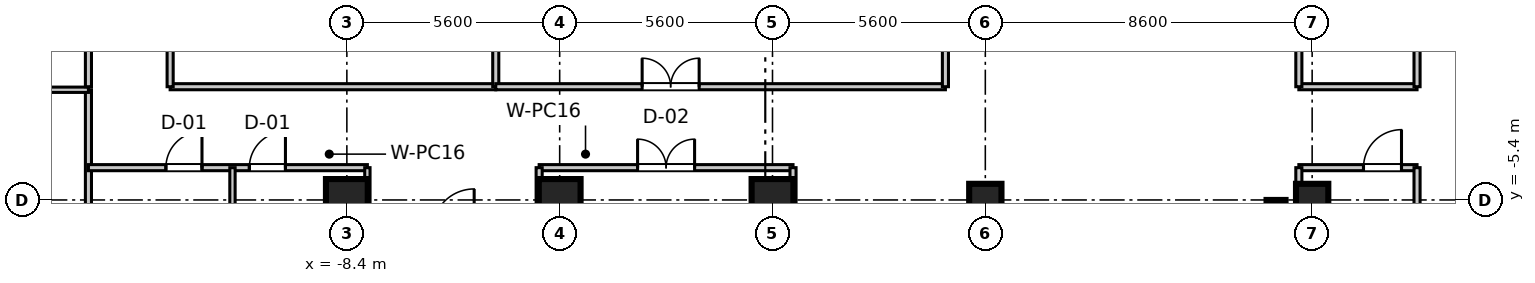
"""IFC4 building model, lengths in metres.
Left out: names, types, materials, properties, quantities, classifications, styles, units other than length and angle.
Written with IfcOpenShell. Run it as: python <this file> out.ifc"""

import sys

from ifc_helpers import new_model, si_unit, direction, frame, frame_2d, origin, origin_2d, place, context, subcontext, project, spatial, rectangle, extrude, source, transform, mapped, element, fill, save


model = new_model("IFC4")
c1 = context("Model", 3, precision=1e-05, world=origin(), true_north=direction((0.0, 1.0)))
c2 = subcontext(c1, "Body", "Model", "MODEL_VIEW")
j1 = project(units=[si_unit("LENGTHUNIT", "METRE"), si_unit("PLANEANGLEUNIT", "RADIAN")], contexts=[c1])
p1 = place(None, origin())
s1 = spatial("IfcSite", under=j1, at=p1, CompositionType="ELEMENT")
p2 = place(p1, origin())
s2 = spatial("IfcBuilding", under=s1, at=p2, CompositionType="ELEMENT")
p3 = place(p2, frame((0.0, 0.0, 149.0)))
s3 = spatial("IfcBuildingStorey", under=s2, at=p3, CompositionType="ELEMENT", Elevation=149.0)
m1 = source(origin(), c2, "Body", "SweptSolid", [
    extrude(rectangle(XDim=1.1, YDim=1.1, at=origin_2d()), origin(), (0.0, 0.0, 1.0), 3.605),
])
for number, where, z_axis, x_axis in (
    (1, (-8.4, -5.4, 0.0), (0.0, 0.0, 1.0), (1.0, 0.0, 0.0)),
    (2, (-2.8, -5.4, 0.0), (0.0, 0.0, 1.0), (1.0, 0.0, 0.0)),
    (3, (2.8, -5.4, 0.0), (0.0, 0.0, 1.0), (1.0, 0.0, 0.0)),
):
    element("IfcColumn", number, at=place(p3, frame(where, z_axis=z_axis, x_axis=x_axis)), inside=s3, PredefinedType="COLUMN", context=c2, shape_type="MappedRepresentation", body=[
        mapped(m1, transform((0.0, 0.0, 0.0), scale=1.0)),
    ])
m2 = source(origin(), c2, "Body", "SweptSolid", [
    extrude(rectangle(XDim=0.85, YDim=0.85, at=origin_2d()), origin(), (0.0, 0.0, 1.0), 3.605),
])
for number, where, z_axis, x_axis in (
    (4, (8.4, -5.4, 0.0), (0.0, 0.0, 1.0), (1.0, 0.0, 0.0)),
    (5, (17.0, -5.4, 0.0), (0.0, 0.0, 1.0), (1.0, 0.0, 0.0)),
):
    element("IfcColumn", number, at=place(p3, frame(where, z_axis=z_axis, x_axis=x_axis)), inside=s3, PredefinedType="PILASTER", context=c2, shape_type="MappedRepresentation", body=[
        mapped(m2, transform((0.0, 0.0, 0.0), scale=1.0)),
    ])
m3 = source(origin(), c2, "Body", "SweptSolid", [
    extrude(rectangle(XDim=11.6, YDim=0.5, at=frame_2d((5.8, 0.0))), origin(), (0.0, 0.0, 1.0), 3.39),
])
p4 = place(p3, frame((16.05, -17.0, 0.0), z_axis=(0.0, 0.0, 1.0), x_axis=(0.0, 1.0, 0.0)))
e6 = element("IfcWall", 6, at=p4, inside=s3, PredefinedType="SHEAR", context=c2, shape_type="MappedRepresentation", body=[
    mapped(m3, transform((0.0, 0.0, 0.0), scale=1.0)),
])
m4 = source(origin(), c2, "Body", "SweptSolid", [
    extrude(rectangle(XDim=3.11, YDim=0.16, at=frame_2d((1.555, 0.0))), origin(), (0.0, 0.0, 1.0), 2.73),
])
p5 = place(p3, frame((16.65, -4.55, 0.0), z_axis=(0.0, 0.0, 1.0), x_axis=(1.0, 0.0, 0.0)))
e7 = element("IfcWall", 7, at=p5, inside=s3, PredefinedType="PARTITIONING", context=c2, shape_type="MappedRepresentation", body=[
    mapped(m4, transform((0.0, 0.0, 0.0), scale=1.0)),
])
p6 = place(p5, frame((1.701, 0.0, 0.0)))
e8 = element("IfcOpeningElement", 8, at=p6, cuts=e7, PredefinedType="OPENING", context=c2, shape_type="SweptSolid", body=[
    extrude(rectangle(XDim=1.0, YDim=2.1, at=frame_2d((0.5, 1.05))), frame((0.0, 0.09, 0.0), z_axis=(0.0, -1.0, 0.0), x_axis=(1.0, 0.0, 0.0)), (0.0, 0.0, 1.0), 0.18),
])
m5 = source(origin(), c2, "Body", "SweptSolid", [
    extrude(rectangle(XDim=17.95, YDim=0.16, at=frame_2d((8.975, 0.0))), origin(), (0.0, 0.0, 1.0), 2.73),
])
p7 = place(p3, frame((16.65, -22.5, 0.0), z_axis=(0.0, 0.0, 1.0), x_axis=(0.0, 1.0, 0.0)))
e9 = element("IfcWall", 9, at=p7, inside=s3, PredefinedType="PARTITIONING", context=c2, shape_type="MappedRepresentation", body=[
    mapped(m5, transform((0.0, 0.0, 0.0), scale=1.0)),
])
m6 = source(origin(), c2, "Body", "SweptSolid", [
    extrude(rectangle(XDim=16.53, YDim=0.16, at=frame_2d((8.265, 0.0))), origin(), (0.0, 0.0, 1.0), 2.73),
])
p8 = place(p3, frame((19.76, -21.08, 0.0), z_axis=(0.0, 0.0, 1.0), x_axis=(0.0, 1.0, 0.0)))
e10 = element("IfcWall", 10, at=p8, inside=s3, PredefinedType="PARTITIONING", context=c2, shape_type="MappedRepresentation", body=[
    mapped(m6, transform((0.0, 0.0, 0.0), scale=1.0)),
])
m7 = source(origin(), c2, "Body", "SweptSolid", [
    extrude(rectangle(XDim=20.0, YDim=0.16, at=frame_2d((10.0, 0.0))), origin(), (0.0, 0.0, 1.0), 2.73),
])
p9 = place(p3, frame((-15.2, -22.5, 0.0), z_axis=(0.0, 0.0, 1.0), x_axis=(0.0, 1.0, 0.0)))
e11 = element("IfcWall", 11, at=p9, inside=s3, PredefinedType="PARTITIONING", context=c2, shape_type="MappedRepresentation", body=[
    mapped(m7, transform((0.0, 0.0, 0.0), scale=1.0)),
])
p10 = place(p9, frame((10.785, 0.0, 0.0)))
e12 = element("IfcOpeningElement", 12, at=p10, cuts=e11, PredefinedType="OPENING", context=c2, shape_type="SweptSolid", body=[
    extrude(rectangle(XDim=0.95, YDim=2.1, at=frame_2d((0.475, 1.05))), frame((0.0, 0.09, 0.0), z_axis=(0.0, -1.0, 0.0), x_axis=(1.0, 0.0, 0.0)), (0.0, 0.0, 1.0), 0.18),
])
m8 = source(origin(), c2, "Body", "SweptSolid", [
    extrude(rectangle(XDim=4.56, YDim=0.14, at=frame_2d((2.28, 0.0))), origin(), (0.0, 0.0, 1.0), 2.73),
])
p11 = place(p3, frame((-19.76, -2.5, 0.0), z_axis=(0.0, 0.0, 1.0), x_axis=(1.0, 0.0, 0.0)))
e13 = element("IfcWall", 13, at=p11, inside=s3, PredefinedType="PARTITIONING", context=c2, shape_type="MappedRepresentation", body=[
    mapped(m8, transform((0.0, 0.0, 0.0), scale=1.0)),
])
m9 = source(origin(), c2, "Body", "SweptSolid", [
    extrude(rectangle(XDim=7.34, YDim=0.16, at=frame_2d((3.67, 0.0))), origin(), (0.0, 0.0, 1.0), 2.73),
])
p12 = place(p3, frame((-15.2, -4.55, 0.0), z_axis=(0.0, 0.0, 1.0), x_axis=(1.0, 0.0, 0.0)))
e14 = element("IfcWall", 14, at=p12, inside=s3, PredefinedType="PARTITIONING", context=c2, shape_type="MappedRepresentation", body=[
    mapped(m9, transform((0.0, 0.0, 0.0), scale=1.0)),
])
p13 = place(p12, frame((2.038, 0.0, 0.0)))
e15 = element("IfcOpeningElement", 15, at=p13, cuts=e14, PredefinedType="OPENING", context=c2, shape_type="SweptSolid", body=[
    extrude(rectangle(XDim=0.95, YDim=2.1, at=frame_2d((0.475, 1.05))), frame((0.0, 0.09, 0.0), z_axis=(0.0, -1.0, 0.0), x_axis=(1.0, 0.0, 0.0)), (0.0, 0.0, 1.0), 0.18),
])
p14 = place(p12, frame((4.234, 0.0, 0.0)))
e16 = element("IfcOpeningElement", 16, at=p14, cuts=e14, PredefinedType="OPENING", context=c2, shape_type="SweptSolid", body=[
    extrude(rectangle(XDim=0.95, YDim=2.1, at=frame_2d((0.475, 1.05))), frame((0.0, 0.09, 0.0), z_axis=(0.0, -1.0, 0.0), x_axis=(1.0, 0.0, 0.0)), (0.0, 0.0, 1.0), 0.18),
])
m10 = source(origin(), c2, "Body", "SweptSolid", [
    extrude(rectangle(XDim=17.95, YDim=0.14, at=frame_2d((8.975, 0.0))), origin(), (0.0, 0.0, 1.0), 2.73),
])
for number, where, z_axis, x_axis in (
    (17, (-7.86, -22.5, 0.0), (0.0, 0.0, 1.0), (0.0, 1.0, 0.0)),
    (18, (-11.41, -22.5, 0.0), (0.0, 0.0, 1.0), (0.0, 1.0, 0.0)),
):
    element("IfcWall", number, at=place(p3, frame(where, z_axis=z_axis, x_axis=x_axis)), inside=s3, PredefinedType="PARTITIONING", context=c2, shape_type="MappedRepresentation", body=[
        mapped(m10, transform((0.0, 0.0, 0.0), scale=1.0)),
    ])
m11 = source(origin(), c2, "Body", "SweptSolid", [
    extrude(rectangle(XDim=6.68, YDim=0.16, at=frame_2d((3.34, 0.0))), origin(), (0.0, 0.0, 1.0), 2.73),
])
p15 = place(p3, frame((-3.34, -4.55, 0.0), z_axis=(0.0, 0.0, 1.0), x_axis=(1.0, 0.0, 0.0)))
e19 = element("IfcWall", 19, at=p15, inside=s3, PredefinedType="PARTITIONING", context=c2, shape_type="MappedRepresentation", body=[
    mapped(m11, transform((0.0, 0.0, 0.0), scale=1.0)),
])
p16 = place(p15, frame((2.59, 0.0, 0.0)))
e20 = element("IfcOpeningElement", 20, at=p16, cuts=e19, PredefinedType="OPENING", context=c2, shape_type="SweptSolid", body=[
    extrude(rectangle(XDim=1.5, YDim=2.15, at=frame_2d((0.75, 1.075))), frame((0.0, 0.09, 0.0), z_axis=(0.0, -1.0, 0.0), x_axis=(1.0, 0.0, 0.0)), (0.0, 0.0, 1.0), 0.18),
])
for number, where, z_axis, x_axis in (
    (21, (-3.34, -22.5, 0.0), (0.0, 0.0, 1.0), (0.0, 1.0, 0.0)),
    (22, (3.34, -22.5, 0.0), (0.0, 0.0, 1.0), (0.0, 1.0, 0.0)),
):
    element("IfcWall", number, at=place(p3, frame(where, z_axis=z_axis, x_axis=x_axis)), inside=s3, PredefinedType="PARTITIONING", context=c2, shape_type="MappedRepresentation", body=[
        mapped(m5, transform((0.0, 0.0, 0.0), scale=1.0)),
    ])
m12 = source(origin(), c2, "Body", "SweptSolid", [
    extrude(rectangle(XDim=4.84, YDim=0.16, at=frame_2d((2.42, 0.0))), origin(), (0.0, 0.0, 1.0), 2.73),
])
p17 = place(p3, frame((-15.2, -2.42, 0.0), z_axis=(0.0, 0.0, 1.0), x_axis=(0.0, 1.0, 0.0)))
e23 = element("IfcWall", 23, at=p17, inside=s3, PredefinedType="PARTITIONING", context=c2, shape_type="MappedRepresentation", body=[
    mapped(m12, transform((0.0, 0.0, 0.0), scale=1.0)),
])
p18 = place(p17, frame((1.945, 0.0, 0.0)))
e24 = element("IfcOpeningElement", 24, at=p18, cuts=e23, PredefinedType="OPENING", context=c2, shape_type="SweptSolid", body=[
    extrude(rectangle(XDim=0.95, YDim=2.1, at=frame_2d((0.475, 1.05))), frame((0.0, 0.09, 0.0), z_axis=(0.0, -1.0, 0.0), x_axis=(1.0, 0.0, 0.0)), (0.0, 0.0, 1.0), 0.18),
])
m13 = source(origin(), c2, "Body", "SweptSolid", [
    extrude(rectangle(XDim=8.568, YDim=0.16, at=frame_2d((4.284, 0.0))), origin(), (0.0, 0.0, 1.0), 2.73),
])
p19 = place(p3, frame((-13.05, -2.42, 0.0), z_axis=(0.0, 0.0, 1.0), x_axis=(1.0, 0.0, 0.0)))
e25 = element("IfcWall", 25, at=p19, inside=s3, PredefinedType="PARTITIONING", context=c2, shape_type="MappedRepresentation", body=[
    mapped(m13, transform((0.0, 0.0, 0.0), scale=1.0)),
])
for number, where, z_axis, x_axis in (
    (26, (-13.05, -2.42, 0.0), (0.0, 0.0, 1.0), (0.0, 1.0, 0.0)),
    (27, (-4.482, -2.42, 0.0), (0.0, 0.0, 1.0), (0.0, 1.0, 0.0)),
):
    element("IfcWall", number, at=place(p3, frame(where, z_axis=z_axis, x_axis=x_axis)), inside=s3, PredefinedType="PARTITIONING", context=c2, shape_type="MappedRepresentation", body=[
        mapped(m12, transform((0.0, 0.0, 0.0), scale=1.0)),
    ])
m14 = source(origin(), c2, "Body", "SweptSolid", [
    extrude(rectangle(XDim=11.832, YDim=0.16, at=frame_2d((5.916, 0.0))), origin(), (0.0, 0.0, 1.0), 2.73),
])
p20 = place(p3, frame((-4.482, -2.42, 0.0), z_axis=(0.0, 0.0, 1.0), x_axis=(1.0, 0.0, 0.0)))
e28 = element("IfcWall", 28, at=p20, inside=s3, PredefinedType="PARTITIONING", context=c2, shape_type="MappedRepresentation", body=[
    mapped(m14, transform((0.0, 0.0, 0.0), scale=1.0)),
])
p21 = place(p20, frame((3.852, 0.0, 0.0)))
e29 = element("IfcOpeningElement", 29, at=p21, cuts=e28, PredefinedType="OPENING", context=c2, shape_type="SweptSolid", body=[
    extrude(rectangle(XDim=1.5, YDim=2.15, at=frame_2d((0.75, 1.075))), frame((0.0, 0.09, 0.0), z_axis=(0.0, -1.0, 0.0), x_axis=(1.0, 0.0, 0.0)), (0.0, 0.0, 1.0), 0.18),
])
p22 = place(p3, frame((7.35, -2.42, 0.0), z_axis=(0.0, 0.0, 1.0), x_axis=(0.0, 1.0, 0.0)))
e30 = element("IfcWall", 30, at=p22, inside=s3, PredefinedType="PARTITIONING", context=c2, shape_type="MappedRepresentation", body=[
    mapped(m12, transform((0.0, 0.0, 0.0), scale=1.0)),
])
p23 = place(p3, frame((16.65, -2.42, 0.0), z_axis=(0.0, 0.0, 1.0), x_axis=(1.0, 0.0, 0.0)))
e31 = element("IfcWall", 31, at=p23, inside=s3, PredefinedType="PARTITIONING", context=c2, shape_type="MappedRepresentation", body=[
    mapped(m4, transform((0.0, 0.0, 0.0), scale=1.0)),
])
for number, where, z_axis, x_axis in (
    (32, (16.65, -2.42, 0.0), (0.0, 0.0, 1.0), (0.0, 1.0, 0.0)),
    (33, (19.76, -2.42, 0.0), (0.0, 0.0, 1.0), (0.0, 1.0, 0.0)),
):
    element("IfcWall", number, at=place(p3, frame(where, z_axis=z_axis, x_axis=x_axis)), inside=s3, PredefinedType="PARTITIONING", context=c2, shape_type="MappedRepresentation", body=[
        mapped(m12, transform((0.0, 0.0, 0.0), scale=1.0)),
    ])
m15 = source(origin(), c2, "Body", "SweptSolid", [
    extrude(rectangle(XDim=1.0, YDim=2.1, at=frame_2d((0.5, 1.05))), frame((0.0, 0.025, 0.0), z_axis=(0.0, -1.0, 0.0), x_axis=(1.0, 0.0, 0.0)), (0.0, 0.0, 1.0), 0.05),
])
p24 = place(p6, frame((1.0, 0.0, 0.0), z_axis=(0.0, 0.0, 1.0), x_axis=(-1.0, 0.0, 0.0)))
e34 = element("IfcDoor", 34, at=p24, inside=s3, OperationType="SINGLE_SWING_RIGHT", PredefinedType="DOOR", context=c2, shape_type="MappedRepresentation", body=[
    mapped(m15, transform((0.0, 0.0, 0.0), scale=1.0)),
])
fill(e8, e34)
m16 = source(origin(), c2, "Body", "SweptSolid", [
    extrude(rectangle(XDim=0.95, YDim=2.1, at=frame_2d((0.475, 1.05))), frame((0.0, 0.025, 0.0), z_axis=(0.0, -1.0, 0.0), x_axis=(1.0, 0.0, 0.0)), (0.0, 0.0, 1.0), 0.05),
])
p25 = place(p13, frame((0.95, 0.0, 0.0), z_axis=(0.0, 0.0, 1.0), x_axis=(-1.0, 0.0, 0.0)))
e35 = element("IfcDoor", 35, at=p25, inside=s3, OperationType="SINGLE_SWING_RIGHT", PredefinedType="DOOR", context=c2, shape_type="MappedRepresentation", body=[
    mapped(m16, transform((0.0, 0.0, 0.0), scale=1.0)),
])
fill(e15, e35)
p26 = place(p14, frame((0.95, 0.0, 0.0), z_axis=(0.0, 0.0, 1.0), x_axis=(-1.0, 0.0, 0.0)))
e36 = element("IfcDoor", 36, at=p26, inside=s3, OperationType="SINGLE_SWING_RIGHT", PredefinedType="DOOR", context=c2, shape_type="MappedRepresentation", body=[
    mapped(m16, transform((0.0, 0.0, 0.0), scale=1.0)),
])
fill(e16, e36)
m17 = source(origin(), c2, "Body", "SweptSolid", [
    extrude(rectangle(XDim=1.5, YDim=2.15, at=frame_2d((0.75, 1.075))), frame((0.0, 0.025, 0.0), z_axis=(0.0, -1.0, 0.0), x_axis=(1.0, 0.0, 0.0)), (0.0, 0.0, 1.0), 0.05),
])
p27 = place(p16, frame((1.5, 0.0, 0.0), z_axis=(0.0, 0.0, 1.0), x_axis=(-1.0, 0.0, 0.0)))
e37 = element("IfcDoor", 37, at=p27, inside=s3, OperationType="DOUBLE_DOOR_SINGLE_SWING", PredefinedType="DOOR", context=c2, shape_type="MappedRepresentation", body=[
    mapped(m17, transform((0.0, 0.0, 0.0), scale=1.0)),
])
fill(e20, e37)
p28 = place(p21, origin())
e38 = element("IfcDoor", 38, at=p28, inside=s3, OperationType="DOUBLE_DOOR_SINGLE_SWING", PredefinedType="DOOR", context=c2, shape_type="MappedRepresentation", body=[
    mapped(m17, transform((0.0, 0.0, 0.0), scale=1.0)),
])
fill(e29, e38)
save(model, sys.argv[1])
